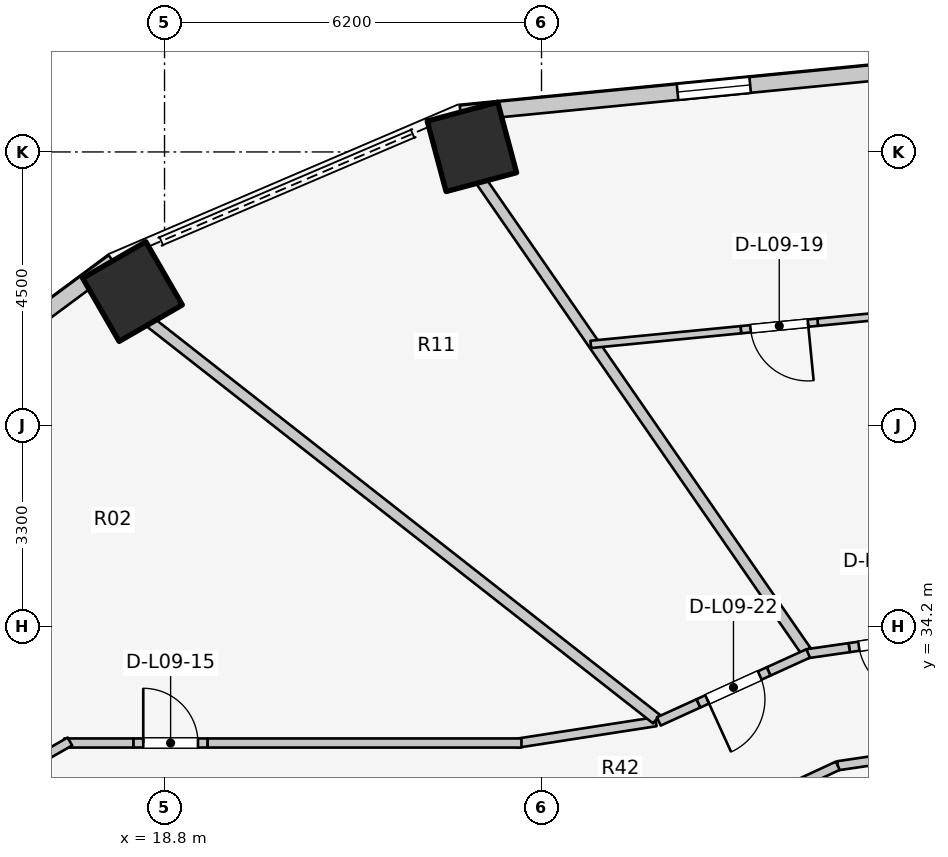
"""IFC4 building model, lengths in metres.
Left out: names, types, materials, properties, quantities, classifications, styles, units other than length and angle.
Written with IfcOpenShell. Run it as: python <this file> out.ifc"""

import sys

from ifc_helpers import new_model, si_unit, direction, frame, frame_2d, origin, origin_2d, place, context, subcontext, project, spatial, rectangle, extrude, element, fill, save


model = new_model("IFC4")
c1 = context("Model", 3, precision=1e-05, world=origin(), true_north=direction((0.0, 1.0)))
c2 = subcontext(c1, "Body", "Model", "MODEL_VIEW")
j1 = project(units=[si_unit("LENGTHUNIT", "METRE"), si_unit("PLANEANGLEUNIT", "RADIAN")], contexts=[c1])
p1 = place(None, origin())
s1 = spatial("IfcSite", under=j1, at=p1, CompositionType="ELEMENT")
p2 = place(p1, origin())
s2 = spatial("IfcBuilding", under=s1, at=p2, CompositionType="ELEMENT")
p3 = place(p2, frame((0.0, 0.0, 33.8)))
s3 = spatial("IfcBuildingStorey", under=s2, at=p3, CompositionType="ELEMENT", Elevation=33.8)
for number, where, z_axis, x_axis in (
    (1, (23.855, 42.084, 0.0), (0.0, 0.0, 1.0), (-0.259, 0.966, 0.0)),
    (2, (18.273, 39.704, 0.0), (0.0, 0.0, 1.0), (-0.5, 0.866, 0.0)),
):
    element("IfcColumn", number, at=place(p3, frame(where, z_axis=z_axis, x_axis=x_axis)), inside=s3, PredefinedType="COLUMN", context=c2, shape_type="SweptSolid", body=[
        extrude(rectangle(XDim=1.2, YDim=1.2, at=origin_2d()), origin(), (0.0, 0.0, 1.0), 3.1),
    ])
p4 = place(p3, frame((32.0, 43.451, 0.0), z_axis=(0.0, 0.0, 1.0), x_axis=(-0.995247718352, -0.097375454379, 0.0)))
e3 = element("IfcWall", 3, at=p4, inside=s3, PredefinedType="STANDARD", context=c2, shape_type="SweptSolid", body=[
    extrude(rectangle(XDim=8.372, YDim=0.26, at=frame_2d((4.186, 0.0))), origin(), (0.0, 0.0, 1.0), 1.22),
])
p5 = place(p4, frame((3.586, 0.0, 0.15)))
e4 = element("IfcOpeningElement", 4, at=p5, cuts=e3, PredefinedType="OPENING", context=c2, shape_type="SweptSolid", body=[
    extrude(rectangle(XDim=1.2, YDim=0.9, at=frame_2d((0.6, 0.45))), frame((0.0, 0.14, 0.0), z_axis=(0.0, -1.0, 0.0), x_axis=(1.0, 0.0, 0.0)), (0.0, 0.0, 1.0), 0.28),
])
p6 = place(p3, frame((17.958, 40.197, 0.0), z_axis=(0.0, 0.0, 1.0), x_axis=(-0.803477531792, -0.595335078679, 0.0)))
e5 = element("IfcWall", 5, at=p6, inside=s3, PredefinedType="STANDARD", context=c2, shape_type="SweptSolid", body=[
    extrude(rectangle(XDim=5.43, YDim=0.26, at=frame_2d((2.715, 0.0))), origin(), (0.0, 0.0, 1.0), 1.22),
])
p7 = place(p3, frame((32.0, 32.22, 0.0), z_axis=(0.0, 0.0, 1.0), x_axis=(-0.989268584896, -0.146108408166, 0.0)))
e6 = element("IfcWall", 6, at=p7, inside=s3, PredefinedType="PARTITIONING", context=c2, shape_type="SweptSolid", body=[
    extrude(rectangle(XDim=2.151, YDim=0.15, at=frame_2d((1.075, 0.0))), origin(), (0.0, 0.0, 1.0), 1.957),
])
p8 = place(p3, frame((29.873, 31.906, 0.0), z_axis=(0.0, 0.0, 1.0), x_axis=(-0.906943449489, -0.421252393975, 0.0)))
e7 = element("IfcWall", 7, at=p8, inside=s3, PredefinedType="PARTITIONING", context=c2, shape_type="SweptSolid", body=[
    extrude(rectangle(XDim=2.186, YDim=0.15, at=frame_2d((1.093, 0.0))), origin(), (0.0, 0.0, 1.0), 1.957),
])
p9 = place(p3, frame((26.881, 32.631, 0.0), z_axis=(0.0, 0.0, 1.0), x_axis=(-0.988184633586, -0.153268163508, 0.0)))
e8 = element("IfcWall", 8, at=p9, inside=s3, PredefinedType="PARTITIONING", context=c2, shape_type="SweptSolid", body=[
    extrude(rectangle(XDim=2.318, YDim=0.15, at=frame_2d((1.159, 0.0))), origin(), (0.0, 0.0, 1.0), 1.957),
])
p10 = place(p3, frame((17.15, 32.28, 0.0), z_axis=(0.0, 0.0, 1.0), x_axis=(1.0, 0.0, 0.0)))
e9 = element("IfcWall", 9, at=p10, inside=s3, PredefinedType="PARTITIONING", context=c2, shape_type="SweptSolid", body=[
    extrude(rectangle(XDim=1.14, YDim=0.15, at=frame_2d((0.57, 0.0))), origin(), (0.0, 0.0, 1.0), 2.575),
])
p11 = place(p3, frame((18.29, 32.28, 0.0), z_axis=(0.0, 0.0, 1.0), x_axis=(1.0, 0.0, 0.0)))
e10 = element("IfcWall", 10, at=p11, inside=s3, PredefinedType="PARTITIONING", context=c2, shape_type="SweptSolid", body=[
    extrude(rectangle(XDim=1.22, YDim=0.15, at=frame_2d((0.61, 0.0))), origin(), (0.0, 0.0, 1.0), 2.575),
])
p12 = place(p11, frame((0.16, 0.0, 0.0)))
e11 = element("IfcOpeningElement", 11, at=p12, cuts=e10, PredefinedType="OPENING", context=c2, shape_type="SweptSolid", body=[
    extrude(rectangle(XDim=0.9, YDim=2.1, at=frame_2d((0.45, 1.05))), frame((0.0, 0.085, 0.0), z_axis=(0.0, -1.0, 0.0), x_axis=(1.0, 0.0, 0.0)), (0.0, 0.0, 1.0), 0.17),
])
p13 = place(p3, frame((19.51, 32.28, 0.0), z_axis=(0.0, 0.0, 1.0), x_axis=(1.0, 0.0, 0.0)))
e12 = element("IfcWall", 12, at=p13, inside=s3, PredefinedType="PARTITIONING", context=c2, shape_type="SweptSolid", body=[
    extrude(rectangle(XDim=5.16, YDim=0.15, at=frame_2d((2.58, 0.0))), origin(), (0.0, 0.0, 1.0), 1.957),
])
p14 = place(p3, frame((17.243, 32.305, 0.0), z_axis=(0.0, 0.0, 1.0), x_axis=(-0.867991349648, -0.496579315857, 0.0)))
e13 = element("IfcWall", 13, at=p14, inside=s3, PredefinedType="PARTITIONING", context=c2, shape_type="SweptSolid", body=[
    extrude(rectangle(XDim=2.567, YDim=0.15, at=frame_2d((1.283, 0.0))), origin(), (0.0, 0.0, 1.0), 1.22),
])
p15 = place(p3, frame((29.347, 33.796, 0.0), z_axis=(0.0, 0.0, 1.0), x_axis=(-0.568631434817, 0.822592421153, 0.0)))
e14 = element("IfcWall", 14, at=p15, inside=s3, PredefinedType="PARTITIONING", context=c2, shape_type="SweptSolid", body=[
    extrude(rectangle(XDim=9.394, YDim=0.18, at=frame_2d((4.697, 0.0))), origin(), (0.0, 0.0, 1.0), 1.957),
])
p16 = place(p3, frame((26.892, 32.673, 0.0), z_axis=(0.0, 0.0, 1.0), x_axis=(-0.78700868866, 0.616941912966, 0.0)))
e15 = element("IfcWall", 15, at=p16, inside=s3, PredefinedType="PARTITIONING", context=c2, shape_type="SweptSolid", body=[
    extrude(rectangle(XDim=10.583, YDim=0.18, at=frame_2d((5.292, 0.0))), origin(), (0.0, 0.0, 1.0), 1.957),
])
p17 = place(p3, frame((32.01, 39.441, 0.0), z_axis=(0.0, 0.0, 1.0), x_axis=(-0.995256979001, -0.097280757346, 0.0)))
e16 = element("IfcWall", 16, at=p17, inside=s3, PredefinedType="MOVABLE", context=c2, shape_type="SweptSolid", body=[
    extrude(rectangle(XDim=2.479, YDim=0.12, at=frame_2d((1.24, 0.0))), origin(), (0.0, 0.0, 1.0), 1.957),
])
p18 = place(p3, frame((29.542, 39.2, 0.0), z_axis=(0.0, 0.0, 1.0), x_axis=(-0.995257398837, -0.097276462007, 0.0)))
e17 = element("IfcWall", 17, at=p18, inside=s3, PredefinedType="MOVABLE", context=c2, shape_type="SweptSolid", body=[
    extrude(rectangle(XDim=1.27, YDim=0.12, at=frame_2d((0.635, 0.0))), origin(), (0.0, 0.0, 1.0), 2.575),
])
p19 = place(p18, frame((0.16, 0.0, 0.0)))
e18 = element("IfcOpeningElement", 18, at=p19, cuts=e17, PredefinedType="OPENING", context=c2, shape_type="SweptSolid", body=[
    extrude(rectangle(XDim=0.95, YDim=2.1, at=frame_2d((0.475, 1.05))), frame((0.0, 0.07, 0.0), z_axis=(0.0, -1.0, 0.0), x_axis=(1.0, 0.0, 0.0)), (0.0, 0.0, 1.0), 0.14),
])
p20 = place(p3, frame((28.278, 39.076, 0.0), z_axis=(0.0, 0.0, 1.0), x_axis=(-0.995257910667, -0.097271225219, 0.0)))
e19 = element("IfcWall", 19, at=p20, inside=s3, PredefinedType="MOVABLE", context=c2, shape_type="SweptSolid", body=[
    extrude(rectangle(XDim=2.48, YDim=0.12, at=frame_2d((1.24, 0.0))), origin(), (0.0, 0.0, 1.0), 1.957),
])
p21 = place(p3, frame((31.318, 34.03, 0.0), z_axis=(0.0, 0.0, 1.0), x_axis=(-0.989690239562, -0.143224403355, 0.0)))
e20 = element("IfcWall", 20, at=p21, inside=s3, PredefinedType="PARTITIONING", context=c2, shape_type="SweptSolid", body=[
    extrude(rectangle(XDim=1.27, YDim=0.15, at=frame_2d((0.635, 0.0))), origin(), (0.0, 0.0, 1.0), 2.575),
])
p22 = place(p21, frame((0.16, 0.0, 0.0)))
e21 = element("IfcOpeningElement", 21, at=p22, cuts=e20, PredefinedType="OPENING", context=c2, shape_type="SweptSolid", body=[
    extrude(rectangle(XDim=0.95, YDim=2.1, at=frame_2d((0.475, 1.05))), frame((0.0, 0.085, 0.0), z_axis=(0.0, -1.0, 0.0), x_axis=(1.0, 0.0, 0.0)), (0.0, 0.0, 1.0), 0.17),
])
p23 = place(p3, frame((30.061, 33.848, 0.0), z_axis=(0.0, 0.0, 1.0), x_axis=(-0.989723948494, -0.142991278678, 0.0)))
e22 = element("IfcWall", 22, at=p23, inside=s3, PredefinedType="PARTITIONING", context=c2, shape_type="SweptSolid", body=[
    extrude(rectangle(XDim=0.697, YDim=0.15, at=frame_2d((0.348, 0.0))), origin(), (0.0, 0.0, 1.0), 2.575),
])
p24 = place(p3, frame((29.385, 33.753, 0.0), z_axis=(0.0, 0.0, 1.0), x_axis=(-0.910167389119, -0.414240659261, 0.0)))
e23 = element("IfcWall", 23, at=p24, inside=s3, PredefinedType="PARTITIONING", context=c2, shape_type="SweptSolid", body=[
    extrude(rectangle(XDim=0.714, YDim=0.15, at=frame_2d((0.357, 0.0))), origin(), (0.0, 0.0, 1.0), 1.957),
])
p25 = place(p3, frame((28.735, 33.457, 0.0), z_axis=(0.0, 0.0, 1.0), x_axis=(-0.910241350267, -0.414078113722, 0.0)))
e24 = element("IfcWall", 24, at=p25, inside=s3, PredefinedType="PARTITIONING", context=c2, shape_type="SweptSolid", body=[
    extrude(rectangle(XDim=1.27, YDim=0.15, at=frame_2d((0.635, 0.0))), origin(), (0.0, 0.0, 1.0), 2.16),
])
p26 = place(p25, frame((0.16, 0.0, 0.0)))
e25 = element("IfcOpeningElement", 25, at=p26, cuts=e24, PredefinedType="OPENING", context=c2, shape_type="SweptSolid", body=[
    extrude(rectangle(XDim=0.95, YDim=2.1, at=frame_2d((0.475, 1.05))), frame((0.0, 0.085, 0.0), z_axis=(0.0, -1.0, 0.0), x_axis=(1.0, 0.0, 0.0)), (0.0, 0.0, 1.0), 0.17),
])
p27 = place(p3, frame((27.579, 32.931, 0.0), z_axis=(0.0, 0.0, 1.0), x_axis=(-0.910108713425, -0.414369556976, 0.0)))
e26 = element("IfcWall", 26, at=p27, inside=s3, PredefinedType="PARTITIONING", context=c2, shape_type="SweptSolid", body=[
    extrude(rectangle(XDim=0.714, YDim=0.15, at=frame_2d((0.357, 0.0))), origin(), (0.0, 0.0, 1.0), 2.575),
])
p28 = place(p5, origin())
e27 = element("IfcWindow", 27, at=p28, inside=s3, PartitioningType="SINGLE_PANEL", PredefinedType="WINDOW", context=c2, shape_type="SweptSolid", body=[
    extrude(rectangle(XDim=1.2, YDim=0.9, at=frame_2d((0.6, 0.45))), frame((0.0, 0.03, 0.0), z_axis=(0.0, -1.0, 0.0), x_axis=(1.0, 0.0, 0.0)), (0.0, 0.0, 1.0), 0.06),
])
fill(e4, e27)
p29 = place(p12, origin())
e28 = element("IfcDoor", 28, at=p29, inside=s3, OperationType="SINGLE_SWING_LEFT", PredefinedType="DOOR", context=c2, shape_type="SweptSolid", body=[
    extrude(rectangle(XDim=0.9, YDim=2.1, at=frame_2d((0.45, 1.05))), frame((0.0, 0.025, 0.0), z_axis=(0.0, -1.0, 0.0), x_axis=(1.0, 0.0, 0.0)), (0.0, 0.0, 1.0), 0.05),
])
fill(e11, e28)
p30 = place(p19, origin())
e29 = element("IfcDoor", 29, at=p30, inside=s3, OperationType="SINGLE_SWING_LEFT", PredefinedType="DOOR", context=c2, shape_type="SweptSolid", body=[
    extrude(rectangle(XDim=0.95, YDim=2.1, at=frame_2d((0.475, 1.05))), frame((0.0, 0.025, 0.0), z_axis=(0.0, -1.0, 0.0), x_axis=(1.0, 0.0, 0.0)), (0.0, 0.0, 1.0), 0.05),
])
fill(e18, e29)
p31 = place(p22, origin())
e30 = element("IfcDoor", 30, at=p31, inside=s3, OperationType="SINGLE_SWING_LEFT", PredefinedType="DOOR", context=c2, shape_type="SweptSolid", body=[
    extrude(rectangle(XDim=0.95, YDim=2.1, at=frame_2d((0.475, 1.05))), frame((0.0, 0.025, 0.0), z_axis=(0.0, -1.0, 0.0), x_axis=(1.0, 0.0, 0.0)), (0.0, 0.0, 1.0), 0.05),
])
fill(e21, e30)
p32 = place(p26, origin())
e31 = element("IfcDoor", 31, at=p32, inside=s3, OperationType="SINGLE_SWING_RIGHT", PredefinedType="DOOR", context=c2, shape_type="SweptSolid", body=[
    extrude(rectangle(XDim=0.95, YDim=2.1, at=frame_2d((0.475, 1.05))), frame((0.0, 0.025, 0.0), z_axis=(0.0, -1.0, 0.0), x_axis=(1.0, 0.0, 0.0)), (0.0, 0.0, 1.0), 0.05),
])
fill(e25, e31)
save(model, sys.argv[1])
